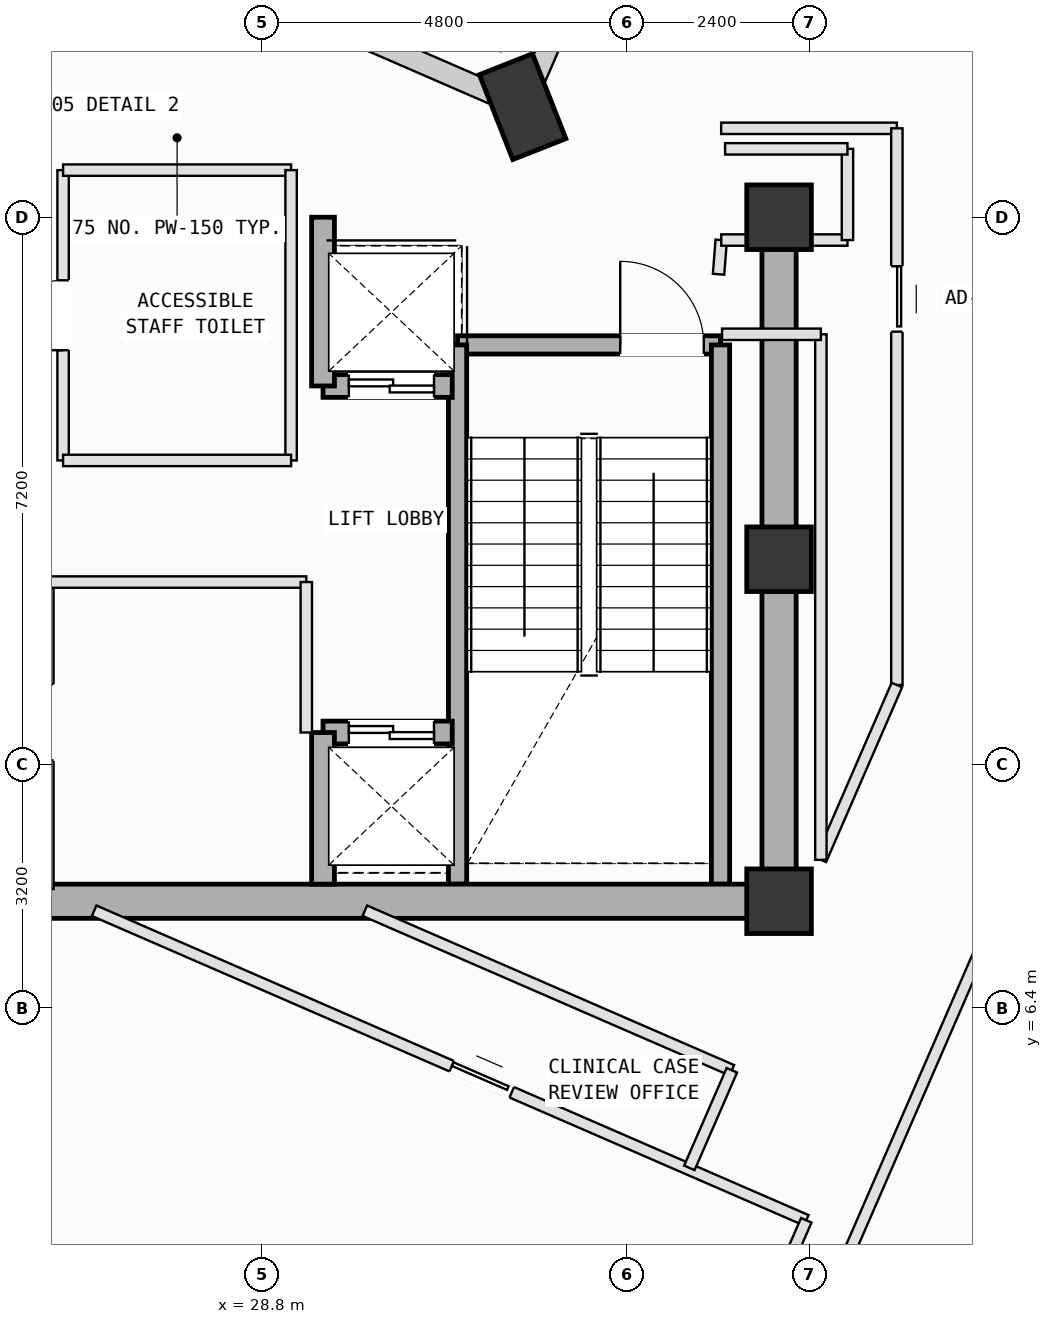
"""IFC4 building model, lengths in metres.
Left out: names, types, materials, properties, quantities, classifications, styles, units other than length and angle.
Written with IfcOpenShell. Run it as: python <this file> out.ifc"""

import sys

from ifc_helpers import new_model, si_unit, direction, frame, frame_2d, origin, origin_2d, place, context, subcontext, project, spatial, rectangle, extrude, element, fill, save


model = new_model("IFC4")
c1 = context("Model", 3, precision=1e-05, world=origin(), true_north=direction((0.0, 1.0)))
c2 = subcontext(c1, "Body", "Model", "MODEL_VIEW")
j1 = project(units=[si_unit("LENGTHUNIT", "METRE"), si_unit("PLANEANGLEUNIT", "RADIAN")], contexts=[c1])
p1 = place(None, origin())
s1 = spatial("IfcSite", under=j1, at=p1, CompositionType="ELEMENT")
p2 = place(p1, origin())
s2 = spatial("IfcBuilding", under=s1, at=p2, CompositionType="ELEMENT")
p3 = place(p2, frame((0.0, 0.0, 308.6)))
s3 = spatial("IfcBuildingStorey", under=s2, at=p3, CompositionType="ELEMENT", Elevation=308.6)
for number, where, z_axis, x_axis in (
    (1, (35.6, 7.8, 0.0), (0.0, 0.0, 1.0), (1.0, 0.0, 0.0)),
    (2, (35.6, 12.3, 0.0), (0.0, 0.0, 1.0), (1.0, 0.0, 0.0)),
    (3, (35.6, 16.8, 0.0), (0.0, 0.0, 1.0), (1.0, 0.0, 0.0)),
):
    element("IfcColumn", number, at=place(p3, frame(where, z_axis=z_axis, x_axis=x_axis)), inside=s3, PredefinedType="COLUMN", context=c2, shape_type="SweptSolid", body=[
        extrude(rectangle(XDim=0.85, YDim=0.85, at=origin_2d()), origin(), (0.0, 0.0, 1.0), 4.0),
    ])
p4 = place(p3, frame((32.226, 18.255, 0.002), z_axis=(0.0, 0.0, 1.0), x_axis=(-0.366501226724, 0.930417567982, 0.0)))
e4 = element("IfcColumn", 4, at=p4, inside=s3, PredefinedType="COLUMN", context=c2, shape_type="SweptSolid", body=[
    extrude(rectangle(XDim=1.2, YDim=0.75, at=origin_2d()), origin(), (0.0, 0.0, 1.0), 3.996),
])
p5 = place(p3, frame((32.385, 18.619, 0.0), z_axis=(0.0, 0.0, 1.0), x_axis=(0.398753668733, 0.917058074318, 0.0)))
e5 = element("IfcWall", 5, at=p5, inside=s3, PredefinedType="SOLIDWALL", context=c2, shape_type="SweptSolid", body=[
    extrude(rectangle(XDim=6.155, YDim=0.28, at=frame_2d((3.078, 0.0))), origin(), (0.0, 0.0, 1.0), 3.265),
])
p6 = place(p5, frame((0.561, 0.0, 0.75)))
e6 = element("IfcOpeningElement", 6, at=p6, cuts=e5, PredefinedType="OPENING", context=c2, shape_type="SweptSolid", body=[
    extrude(rectangle(XDim=1.2, YDim=1.75, at=frame_2d((0.6, 0.875))), frame((0.0, 0.15, 0.0), z_axis=(0.0, -1.0, 0.0), x_axis=(1.0, 0.0, 0.0)), (0.0, 0.0, 1.0), 0.3),
])
p7 = place(p3, frame((25.484, 21.187, 0.0), z_axis=(0.0, 0.0, 1.0), x_axis=(0.917060568388, -0.398747932794, 0.0)))
e7 = element("IfcWall", 7, at=p7, inside=s3, PredefinedType="SOLIDWALL", context=c2, shape_type="SweptSolid", body=[
    extrude(rectangle(XDim=6.955, YDim=0.28, at=frame_2d((3.478, 0.0))), origin(), (0.0, 0.0, 1.0), 2.765),
])
p8 = place(p3, frame((31.37, 15.12, 0.0), z_axis=(0.0, 0.0, 1.0), x_axis=(1.0, 0.0, 0.0)))
e8 = element("IfcWall", 8, at=p8, inside=s3, PredefinedType="SOLIDWALL", context=c2, shape_type="SweptSolid", body=[
    extrude(rectangle(XDim=3.46, YDim=0.24, at=frame_2d((1.73, 0.0))), origin(), (0.0, 0.0, 1.0), 3.78),
])
p9 = place(p8, frame((2.14, 0.0, 0.0)))
e9 = element("IfcOpeningElement", 9, at=p9, cuts=e8, PredefinedType="OPENING", context=c2, shape_type="SweptSolid", body=[
    extrude(rectangle(XDim=1.1, YDim=2.15, at=frame_2d((0.55, 1.075))), frame((0.0, 0.13, 0.0), z_axis=(0.0, -1.0, 0.0), x_axis=(1.0, 0.0, 0.0)), (0.0, 0.0, 1.0), 0.26),
])
for number, where, z_axis, x_axis in (
    (10, (34.83, 15.12, 0.0), (0.0, 0.0, 1.0), (0.0, -1.0, 0.0)),
    (11, (31.37, 8.025, 0.0), (0.0, 0.0, 1.0), (0.0, 1.0, 0.0)),
):
    element("IfcWall", number, at=place(p3, frame(where, z_axis=z_axis, x_axis=x_axis)), inside=s3, PredefinedType="SOLIDWALL", context=c2, shape_type="SweptSolid", body=[
        extrude(rectangle(XDim=7.095, YDim=0.24, at=frame_2d((3.548, 0.0))), origin(), (0.0, 0.0, 1.0), 3.78),
    ])
p10 = place(p3, frame((24.8, 7.8, 0.0), z_axis=(0.0, 0.0, 1.0), x_axis=(1.0, 0.0, 0.0)))
e12 = element("IfcWall", 12, at=p10, inside=s3, PredefinedType="SHEAR", context=c2, shape_type="SweptSolid", body=[
    extrude(rectangle(XDim=10.8, YDim=0.45, at=frame_2d((5.4, 0.0))), origin(), (0.0, 0.0, 1.0), 3.78),
])
p11 = place(p3, frame((35.6, 7.8, 0.0), z_axis=(0.0, 0.0, 1.0), x_axis=(0.0, 1.0, 0.0)))
e13 = element("IfcWall", 13, at=p11, inside=s3, PredefinedType="SHEAR", context=c2, shape_type="SweptSolid", body=[
    extrude(rectangle(XDim=9.0, YDim=0.45, at=frame_2d((4.5, 0.0))), origin(), (0.0, 0.0, 1.0), 3.78),
])
p12 = place(p3, frame((29.6, 10.02, 0.0), z_axis=(0.0, 0.0, 1.0), x_axis=(1.0, 0.0, 0.0)))
e14 = element("IfcWall", 14, at=p12, inside=s3, PredefinedType="SOLIDWALL", context=c2, shape_type="SweptSolid", body=[
    extrude(rectangle(XDim=1.7, YDim=0.3, at=frame_2d((0.85, 0.0))), origin(), (0.0, 0.0, 1.0), 3.78),
])
p13 = place(p12, frame((0.34, 0.0, 0.0)))
e15 = element("IfcOpeningElement", 15, at=p13, cuts=e14, PredefinedType="OPENING", context=c2, shape_type="SweptSolid", body=[
    extrude(rectangle(XDim=1.12, YDim=2.15, at=frame_2d((0.56, 1.075))), frame((0.0, 0.16, 0.0), z_axis=(0.0, -1.0, 0.0), x_axis=(1.0, 0.0, 0.0)), (0.0, 0.0, 1.0), 0.32),
])
p14 = place(p3, frame((29.6, 8.025, 0.0), z_axis=(0.0, 0.0, 1.0), x_axis=(0.0, 1.0, 0.0)))
e16 = element("IfcWall", 16, at=p14, inside=s3, PredefinedType="SOLIDWALL", context=c2, shape_type="SweptSolid", body=[
    extrude(rectangle(XDim=1.995, YDim=0.3, at=frame_2d((0.998, 0.0))), origin(), (0.0, 0.0, 1.0), 3.78),
])
p15 = place(p3, frame((29.6, 14.58, 0.0), z_axis=(0.0, 0.0, 1.0), x_axis=(1.0, 0.0, 0.0)))
e17 = element("IfcWall", 17, at=p15, inside=s3, PredefinedType="SOLIDWALL", context=c2, shape_type="SweptSolid", body=[
    extrude(rectangle(XDim=1.7, YDim=0.3, at=frame_2d((0.85, 0.0))), origin(), (0.0, 0.0, 1.0), 3.78),
])
p16 = place(p15, frame((0.34, 0.0, 0.0)))
e18 = element("IfcOpeningElement", 18, at=p16, cuts=e17, PredefinedType="OPENING", context=c2, shape_type="SweptSolid", body=[
    extrude(rectangle(XDim=1.12, YDim=2.15, at=frame_2d((0.56, 1.075))), frame((0.0, 0.16, 0.0), z_axis=(0.0, -1.0, 0.0), x_axis=(1.0, 0.0, 0.0)), (0.0, 0.0, 1.0), 0.32),
])
p17 = place(p3, frame((29.6, 14.58, 0.0), z_axis=(0.0, 0.0, 1.0), x_axis=(0.0, 1.0, 0.0)))
e19 = element("IfcWall", 19, at=p17, inside=s3, PredefinedType="SOLIDWALL", context=c2, shape_type="SweptSolid", body=[
    extrude(rectangle(XDim=2.22, YDim=0.3, at=frame_2d((1.11, 0.0))), origin(), (0.0, 0.0, 1.0), 3.78),
])
p18 = place(p3, frame((25.98, 7.96, 0.0), z_axis=(0.0, 0.0, 1.0), x_axis=(0.0, 1.0, 0.0)))
e20 = element("IfcWall", 20, at=p18, inside=s3, PredefinedType="PARTITIONING", context=c2, shape_type="SweptSolid", body=[
    extrude(rectangle(XDim=4.04, YDim=0.15, at=frame_2d((2.02, 0.0))), origin(), (0.0, 0.0, 1.0), 3.78),
])
p19 = place(p18, frame((1.695, 0.0, 0.0)))
e21 = element("IfcOpeningElement", 21, at=p19, cuts=e20, PredefinedType="OPENING", context=c2, shape_type="SweptSolid", body=[
    extrude(rectangle(XDim=1.0, YDim=2.12, at=frame_2d((0.5, 1.06))), frame((0.0, 0.085, 0.0), z_axis=(0.0, -1.0, 0.0), x_axis=(1.0, 0.0, 0.0)), (0.0, 0.0, 1.0), 0.17),
])
p20 = place(p3, frame((25.98, 12.0, 0.0), z_axis=(0.0, 0.0, 1.0), x_axis=(1.0, 0.0, 0.0)))
e22 = element("IfcWall", 22, at=p20, inside=s3, PredefinedType="PARTITIONING", context=c2, shape_type="SweptSolid", body=[
    extrude(rectangle(XDim=3.4, YDim=0.15, at=frame_2d((1.7, 0.0))), origin(), (0.0, 0.0, 1.0), 3.78),
])
p21 = place(p3, frame((29.38, 12.0, 0.0), z_axis=(0.0, 0.0, 1.0), x_axis=(0.0, -1.0, 0.0)))
e23 = element("IfcWall", 23, at=p21, inside=s3, PredefinedType="PARTITIONING", context=c2, shape_type="SweptSolid", body=[
    extrude(rectangle(XDim=1.98, YDim=0.15, at=frame_2d((0.99, 0.0))), origin(), (0.0, 0.0, 1.0), 3.78),
])
p22 = place(p3, frame((26.18, 13.6, 0.0), z_axis=(0.0, 0.0, 1.0), x_axis=(0.0, 1.0, 0.0)))
e24 = element("IfcWall", 24, at=p22, inside=s3, PredefinedType="PARTITIONING", context=c2, shape_type="SweptSolid", body=[
    extrude(rectangle(XDim=3.82, YDim=0.15, at=frame_2d((1.91, 0.0))), origin(), (0.0, 0.0, 1.0), 3.78),
])
p23 = place(p22, frame((1.45, 0.0, 0.0)))
e25 = element("IfcOpeningElement", 25, at=p23, cuts=e24, PredefinedType="OPENING", context=c2, shape_type="SweptSolid", body=[
    extrude(rectangle(XDim=0.92, YDim=2.1, at=frame_2d((0.46, 1.05))), frame((0.0, 0.085, 0.0), z_axis=(0.0, -1.0, 0.0), x_axis=(1.0, 0.0, 0.0)), (0.0, 0.0, 1.0), 0.17),
])
p24 = place(p3, frame((26.18, 17.42, 0.0), z_axis=(0.0, 0.0, 1.0), x_axis=(1.0, 0.0, 0.0)))
e26 = element("IfcWall", 26, at=p24, inside=s3, PredefinedType="PARTITIONING", context=c2, shape_type="SweptSolid", body=[
    extrude(rectangle(XDim=3.0, YDim=0.15, at=frame_2d((1.5, 0.0))), origin(), (0.0, 0.0, 1.0), 3.78),
])
p25 = place(p3, frame((29.18, 17.42, 0.0), z_axis=(0.0, 0.0, 1.0), x_axis=(0.0, -1.0, 0.0)))
e27 = element("IfcWall", 27, at=p25, inside=s3, PredefinedType="PARTITIONING", context=c2, shape_type="SweptSolid", body=[
    extrude(rectangle(XDim=3.82, YDim=0.15, at=frame_2d((1.91, 0.0))), origin(), (0.0, 0.0, 1.0), 3.78),
])
p26 = place(p3, frame((29.18, 13.6, 0.0), z_axis=(0.0, 0.0, 1.0), x_axis=(-1.0, 0.0, 0.0)))
e28 = element("IfcWall", 28, at=p26, inside=s3, PredefinedType="PARTITIONING", context=c2, shape_type="SweptSolid", body=[
    extrude(rectangle(XDim=3.0, YDim=0.15, at=frame_2d((1.5, 0.0))), origin(), (0.0, 0.0, 1.0), 3.78),
])
p27 = place(p3, frame((33.286, -4.26, 0.0), z_axis=(0.0, 0.0, 1.0), x_axis=(0.398794571869, 0.9170402878, 0.0)))
e29 = element("IfcWall", 29, at=p27, inside=s3, PredefinedType="PARTITIONING", context=c2, shape_type="SweptSolid", body=[
    extrude(rectangle(XDim=13.04, YDim=0.15, at=frame_2d((6.52, 0.0))), origin(), (0.0, 0.0, 1.0), 2.765),
])
p28 = place(p3, frame((26.589, 7.675, 0.0), z_axis=(0.0, 0.0, 1.0), x_axis=(0.917085632944, -0.398690283112, 0.0)))
e30 = element("IfcWall", 30, at=p28, inside=s3, PredefinedType="PARTITIONING", context=c2, shape_type="SweptSolid", body=[
    extrude(rectangle(XDim=10.216, YDim=0.15, at=frame_2d((5.108, 0.0))), origin(), (0.0, 0.0, 1.0), 3.78),
])
p29 = place(p28, frame((5.131, 0.0, 0.0)))
e31 = element("IfcOpeningElement", 31, at=p29, cuts=e30, PredefinedType="OPENING", context=c2, shape_type="SweptSolid", body=[
    extrude(rectangle(XDim=0.86, YDim=2.06, at=frame_2d((0.43, 1.03))), frame((0.0, 0.085, 0.0), z_axis=(0.0, -1.0, 0.0), x_axis=(1.0, 0.0, 0.0)), (0.0, 0.0, 1.0), 0.17),
])
p30 = place(p3, frame((35.958, 3.602, 0.0), z_axis=(0.0, 0.0, 1.0), x_axis=(-0.398756424957, -0.917056875857, 0.0)))
e32 = element("IfcWall", 32, at=p30, inside=s3, PredefinedType="PARTITIONING", context=c2, shape_type="SweptSolid", body=[
    extrude(rectangle(XDim=8.835, YDim=0.15, at=frame_2d((4.417, 0.0))), origin(), (0.0, 0.0, 1.0), 2.765),
])
p31 = place(p3, frame((34.804, 16.05, 0.0), z_axis=(0.0, 0.0, 1.0), x_axis=(0.077896068279, 0.996961484987, 0.0)))
e33 = element("IfcWall", 33, at=p31, inside=s3, PredefinedType="PARTITIONING", context=c2, shape_type="SweptSolid", body=[
    extrude(rectangle(XDim=0.451, YDim=0.15, at=frame_2d((0.226, 0.0))), origin(), (0.0, 0.0, 1.0), 3.78),
])
p32 = place(p3, frame((34.839, 16.5, 0.0), z_axis=(0.0, 0.0, 1.0), x_axis=(1.0, 0.0, 0.0)))
e34 = element("IfcWall", 34, at=p32, inside=s3, PredefinedType="PARTITIONING", context=c2, shape_type="SweptSolid", body=[
    extrude(rectangle(XDim=1.661, YDim=0.15, at=frame_2d((0.831, 0.0))), origin(), (0.0, 0.0, 1.0), 2.765),
])
p33 = place(p3, frame((36.5, 16.5, 0.0), z_axis=(0.0, 0.0, 1.0), x_axis=(0.0, 1.0, 0.0)))
e35 = element("IfcWall", 35, at=p33, inside=s3, PredefinedType="PARTITIONING", context=c2, shape_type="SweptSolid", body=[
    extrude(rectangle(XDim=1.2, YDim=0.15, at=frame_2d((0.6, 0.0))), origin(), (0.0, 0.0, 1.0), 3.78),
])
p34 = place(p3, frame((36.5, 17.7, 0.0), z_axis=(0.0, 0.0, 1.0), x_axis=(-1.0, 0.0, 0.0)))
e36 = element("IfcWall", 36, at=p34, inside=s3, PredefinedType="PARTITIONING", context=c2, shape_type="SweptSolid", body=[
    extrude(rectangle(XDim=1.61, YDim=0.15, at=frame_2d((0.805, 0.0))), origin(), (0.0, 0.0, 1.0), 3.78),
])
p35 = place(p3, frame((34.838, 17.97, 0.0), z_axis=(0.0, 0.0, 1.0), x_axis=(1.0, 0.0, 0.0)))
e37 = element("IfcWall", 37, at=p35, inside=s3, PredefinedType="PARTITIONING", context=c2, shape_type="SweptSolid", body=[
    extrude(rectangle(XDim=2.312, YDim=0.15, at=frame_2d((1.156, 0.0))), origin(), (0.0, 0.0, 1.0), 3.78),
])
p36 = place(p3, frame((37.15, 17.97, 0.0), z_axis=(0.0, 0.0, 1.0), x_axis=(0.0, -1.0, 0.0)))
e38 = element("IfcWall", 38, at=p36, inside=s3, PredefinedType="PARTITIONING", context=c2, shape_type="SweptSolid", body=[
    extrude(rectangle(XDim=7.325, YDim=0.15, at=frame_2d((3.663, 0.0))), origin(), (0.0, 0.0, 1.0), 3.78),
])
p37 = place(p36, frame((1.815, 0.0, 0.0)))
e39 = element("IfcOpeningElement", 39, at=p37, cuts=e38, PredefinedType="OPENING", context=c2, shape_type="SweptSolid", body=[
    extrude(rectangle(XDim=0.86, YDim=2.06, at=frame_2d((0.43, 1.03))), frame((0.0, 0.085, 0.0), z_axis=(0.0, -1.0, 0.0), x_axis=(1.0, 0.0, 0.0)), (0.0, 0.0, 1.0), 0.17),
])
p38 = place(p3, frame((37.15, 10.645, 0.0), z_axis=(0.0, 0.0, 1.0), x_axis=(-0.398718992482, -0.917073151409, 0.0)))
e40 = element("IfcWall", 40, at=p38, inside=s3, PredefinedType="PARTITIONING", context=c2, shape_type="SweptSolid", body=[
    extrude(rectangle(XDim=2.508, YDim=0.15, at=frame_2d((1.254, 0.0))), origin(), (0.0, 0.0, 1.0), 3.78),
])
p39 = place(p3, frame((36.15, 8.345, 0.0), z_axis=(0.0, 0.0, 1.0), x_axis=(0.0, 1.0, 0.0)))
e41 = element("IfcWall", 41, at=p39, inside=s3, PredefinedType="PARTITIONING", context=c2, shape_type="SweptSolid", body=[
    extrude(rectangle(XDim=6.915, YDim=0.15, at=frame_2d((3.458, 0.0))), origin(), (0.0, 0.0, 1.0), 3.78),
])
p40 = place(p3, frame((36.15, 15.26, 0.0), z_axis=(0.0, 0.0, 1.0), x_axis=(-1.0, 0.0, 0.0)))
e42 = element("IfcWall", 42, at=p40, inside=s3, PredefinedType="PARTITIONING", context=c2, shape_type="SweptSolid", body=[
    extrude(rectangle(XDim=1.3, YDim=0.15, at=frame_2d((0.65, 0.0))), origin(), (0.0, 0.0, 1.0), 3.78),
])
p41 = place(p3, frame((30.15, 7.675, 0.0), z_axis=(0.0, 0.0, 1.0), x_axis=(0.917103960726, -0.398648122059, 0.0)))
e43 = element("IfcWall", 43, at=p41, inside=s3, PredefinedType="PARTITIONING", context=c2, shape_type="SweptSolid", body=[
    extrude(rectangle(XDim=5.266, YDim=0.15, at=frame_2d((2.633, 0.0))), origin(), (0.0, 0.0, 1.0), 3.78),
])
p42 = place(p3, frame((34.979, 5.576, 0.0), z_axis=(0.0, 0.0, 1.0), x_axis=(-0.399236039494, -0.916848179782, 0.0)))
e44 = element("IfcWall", 44, at=p42, inside=s3, PredefinedType="PARTITIONING", context=c2, shape_type="SweptSolid", body=[
    extrude(rectangle(XDim=1.4, YDim=0.15, at=frame_2d((0.7, 0.0))), origin(), (0.0, 0.0, 1.0), 3.78),
])
p43 = place(p9, origin())
e45 = element("IfcDoor", 45, at=p43, inside=s3, OperationType="SINGLE_SWING_LEFT", PredefinedType="DOOR", context=c2, shape_type="SweptSolid", body=[
    extrude(rectangle(XDim=1.1, YDim=2.15, at=frame_2d((0.55, 1.075))), frame((0.0, 0.025, 0.0), z_axis=(0.0, -1.0, 0.0), x_axis=(1.0, 0.0, 0.0)), (0.0, 0.0, 1.0), 0.05),
])
fill(e9, e45)
p44 = place(p13, origin())
e46 = element("IfcDoor", 46, at=p44, inside=s3, OperationType="DOUBLE_DOOR_SLIDING", PredefinedType="DOOR", context=c2, shape_type="SweptSolid", body=[
    extrude(rectangle(XDim=1.12, YDim=2.15, at=frame_2d((0.56, 1.075))), frame((0.0, 0.025, 0.0), z_axis=(0.0, -1.0, 0.0), x_axis=(1.0, 0.0, 0.0)), (0.0, 0.0, 1.0), 0.05),
])
fill(e15, e46)
p45 = place(p16, origin())
e47 = element("IfcDoor", 47, at=p45, inside=s3, OperationType="DOUBLE_DOOR_SLIDING", PredefinedType="DOOR", context=c2, shape_type="SweptSolid", body=[
    extrude(rectangle(XDim=1.12, YDim=2.15, at=frame_2d((0.56, 1.075))), frame((0.0, 0.025, 0.0), z_axis=(0.0, -1.0, 0.0), x_axis=(1.0, 0.0, 0.0)), (0.0, 0.0, 1.0), 0.05),
])
fill(e18, e47)
p46 = place(p23, origin())
e48 = element("IfcDoor", 48, at=p46, inside=s3, OperationType="SINGLE_SWING_LEFT", PredefinedType="DOOR", context=c2, shape_type="SweptSolid", body=[
    extrude(rectangle(XDim=0.92, YDim=2.1, at=frame_2d((0.46, 1.05))), frame((0.0, 0.025, 0.0), z_axis=(0.0, -1.0, 0.0), x_axis=(1.0, 0.0, 0.0)), (0.0, 0.0, 1.0), 0.05),
])
fill(e25, e48)
p47 = place(p37, origin())
e49 = element("IfcDoor", 49, at=p47, inside=s3, OperationType="SLIDING_TO_LEFT", PredefinedType="DOOR", context=c2, shape_type="SweptSolid", body=[
    extrude(rectangle(XDim=0.86, YDim=2.06, at=frame_2d((0.43, 1.03))), frame((0.0, 0.025, 0.0), z_axis=(0.0, -1.0, 0.0), x_axis=(1.0, 0.0, 0.0)), (0.0, 0.0, 1.0), 0.05),
])
fill(e39, e49)
p48 = place(p29, origin())
e50 = element("IfcDoor", 50, at=p48, inside=s3, OperationType="SLIDING_TO_LEFT", PredefinedType="DOOR", context=c2, shape_type="SweptSolid", body=[
    extrude(rectangle(XDim=0.86, YDim=2.06, at=frame_2d((0.43, 1.03))), frame((0.0, 0.025, 0.0), z_axis=(0.0, -1.0, 0.0), x_axis=(1.0, 0.0, 0.0)), (0.0, 0.0, 1.0), 0.05),
])
fill(e31, e50)
save(model, sys.argv[1])
